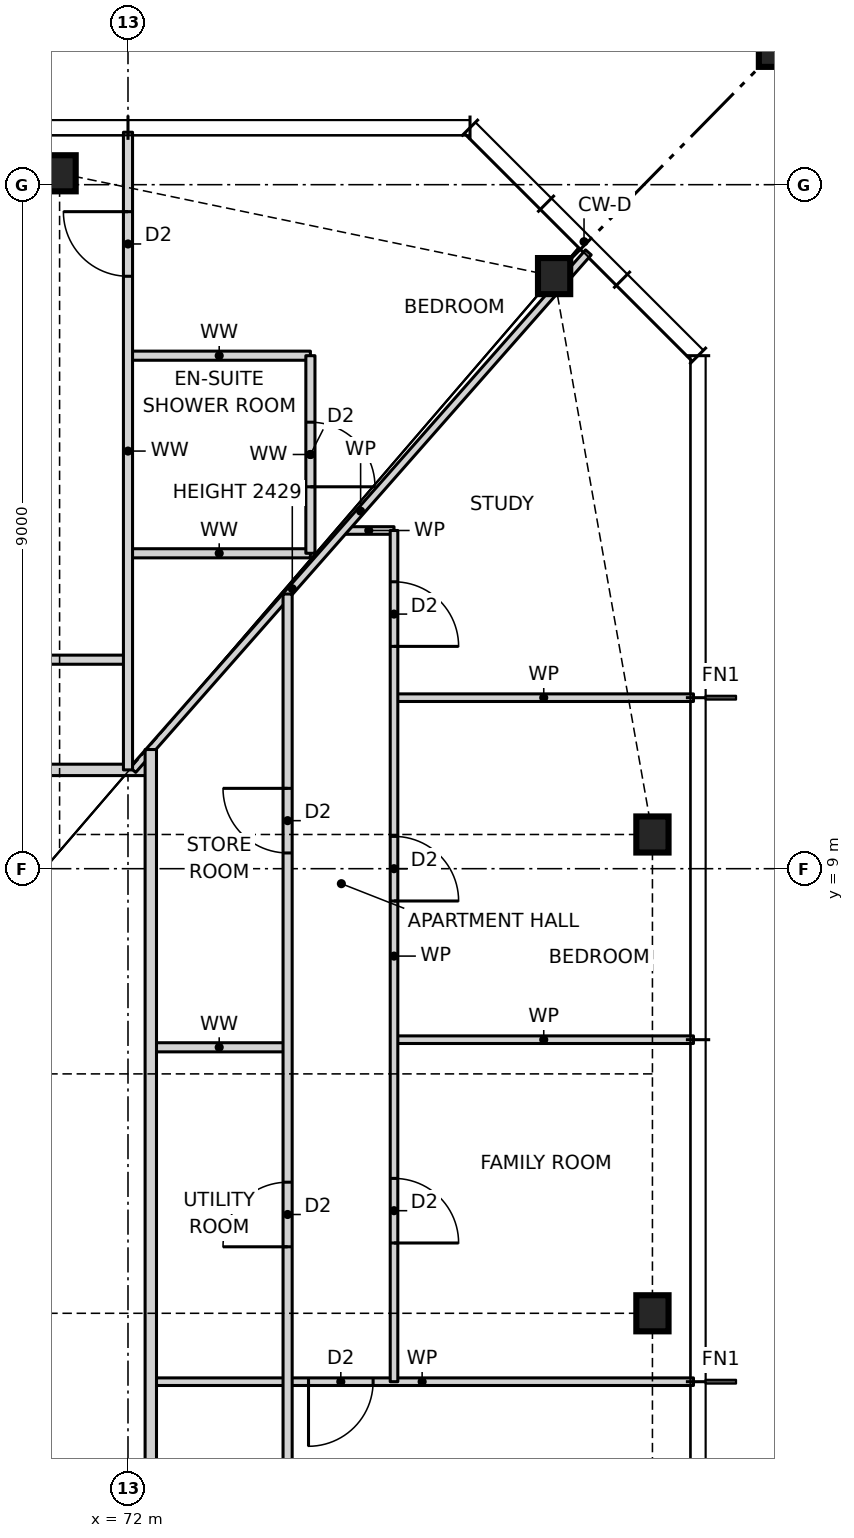
"""IFC4 building model, lengths in metres.
Left out: names, types, materials, properties, quantities, classifications, styles, units other than length and angle.
Written with IfcOpenShell. Run it as: python <this file> out.ifc"""

import sys

from ifc_helpers import new_model, si_unit, direction, frame, frame_2d, origin, origin_2d, place, context, subcontext, project, spatial, rectangle, hollow_rectangle, i_section, extrude, element, fill, save


model = new_model("IFC4")
c1 = context("Model", 3, precision=1e-05, world=origin(), true_north=direction((0.0, 1.0)))
c2 = subcontext(c1, "Body", "Model", "MODEL_VIEW")
j1 = project(units=[si_unit("LENGTHUNIT", "METRE"), si_unit("PLANEANGLEUNIT", "RADIAN")], contexts=[c1])
p1 = place(None, origin())
s1 = spatial("IfcSite", under=j1, at=p1, CompositionType="ELEMENT")
p2 = place(p1, origin())
s2 = spatial("IfcBuilding", under=s1, at=p2, CompositionType="ELEMENT")
p3 = place(p2, frame((0.0, 0.0, 46.5)))
s3 = spatial("IfcBuildingStorey", under=s2, at=p3, CompositionType="ELEMENT", Elevation=46.5)
for number, where, z_axis, x_axis in (
    (1, (78.9, 3.15, 0.0), (0.0, 0.0, 1.0), (1.0, 0.0, 0.0)),
    (2, (78.9, 9.45, 0.0), (0.0, 0.0, 1.0), (1.0, 0.0, 0.0)),
    (3, (77.606, 16.797, 0.0), (0.0, 0.0, 1.0), (1.0, 0.0, 0.0)),
    (4, (71.1, 18.15, 0.0), (0.0, 0.0, 1.0), (1.0, 0.0, 0.0)),
):
    element("IfcColumn", number, at=place(p3, frame(where, z_axis=z_axis, x_axis=x_axis)), inside=s3, PredefinedType="COLUMN", context=c2, shape_type="SweptSolid", body=[
        extrude(i_section(OverallWidth=0.424, OverallDepth=0.475, WebThickness=0.048, FlangeThickness=0.077, at=origin_2d()), origin(), (0.0, 0.0, 1.0), 3.5),
    ])
p4 = place(p3, frame((80.9, 20.15, 0.0), z_axis=(0.0, 0.0, 1.0), x_axis=(1.0, 0.0, 0.0)))
e5 = element("IfcColumn", 5, at=p4, inside=s3, PredefinedType="COLUMN", context=c2, shape_type="SweptSolid", body=[
    extrude(hollow_rectangle(XDim=1.2, YDim=1.2, WallThickness=0.07, at=origin_2d()), origin(), (0.0, 0.0, 1.0), 3.5),
])
p5 = place(p3, frame((72.3, 2.25, 0.0), z_axis=(0.0, 0.0, 1.0), x_axis=(1.0, 0.0, 0.0)))
e6 = element("IfcWall", 6, at=p5, inside=s3, PredefinedType="PARTITIONING", context=c2, shape_type="SweptSolid", body=[
    extrude(rectangle(XDim=7.14, YDim=0.1, at=frame_2d((3.57, 0.0))), origin(), (0.0, 0.0, 1.0), 3.27),
])
p6 = place(p5, frame((2.075, 0.0, 0.0)))
e7 = element("IfcOpeningElement", 7, at=p6, cuts=e6, PredefinedType="OPENING", context=c2, shape_type="SweptSolid", body=[
    extrude(rectangle(XDim=0.85, YDim=2.1, at=frame_2d((0.425, 1.05))), frame((0.0, 0.06, 0.0), z_axis=(0.0, -1.0, 0.0), x_axis=(1.0, 0.0, 0.0)), (0.0, 0.0, 1.0), 0.12),
])
p7 = place(p3, frame((72.3, 6.65, 0.0), z_axis=(0.0, 0.0, 1.0), x_axis=(1.0, 0.0, 0.0)))
e8 = element("IfcWall", 8, at=p7, inside=s3, PredefinedType="PARTITIONING", context=c2, shape_type="SweptSolid", body=[
    extrude(rectangle(XDim=1.8, YDim=0.12, at=frame_2d((0.9, 0.0))), origin(), (0.0, 0.0, 1.0), 3.27),
])
p8 = place(p3, frame((75.5, 6.75, 0.0), z_axis=(0.0, 0.0, 1.0), x_axis=(1.0, 0.0, 0.0)))
e9 = element("IfcWall", 9, at=p8, inside=s3, PredefinedType="PARTITIONING", context=c2, shape_type="SweptSolid", body=[
    extrude(rectangle(XDim=3.94, YDim=0.1, at=frame_2d((1.97, 0.0))), origin(), (0.0, 0.0, 1.0), 3.27),
])
p9 = place(p3, frame((53.7, 10.3, 0.0), z_axis=(0.0, 0.0, 1.0), x_axis=(1.0, 0.0, 0.0)))
e10 = element("IfcWall", 10, at=p9, inside=s3, PredefinedType="PARTITIONING", context=c2, shape_type="SweptSolid", body=[
    extrude(rectangle(XDim=18.6, YDim=0.15, at=frame_2d((9.3, 0.0))), origin(), (0.0, 0.0, 1.0), 3.27),
])
p10 = place(p9, frame((12.8, 0.0, 0.0)))
e11 = element("IfcOpeningElement", 11, at=p10, cuts=e10, PredefinedType="OPENING", context=c2, shape_type="SweptSolid", body=[
    extrude(rectangle(XDim=1.0, YDim=2.1, at=frame_2d((0.5, 1.05))), frame((0.0, 0.085, 0.0), z_axis=(0.0, -1.0, 0.0), x_axis=(1.0, 0.0, 0.0)), (0.0, 0.0, 1.0), 0.17),
])
p11 = place(p3, frame((75.5, 11.25, 0.0), z_axis=(0.0, 0.0, 1.0), x_axis=(1.0, 0.0, 0.0)))
e12 = element("IfcWall", 12, at=p11, inside=s3, PredefinedType="PARTITIONING", context=c2, shape_type="SweptSolid", body=[
    extrude(rectangle(XDim=3.94, YDim=0.1, at=frame_2d((1.97, 0.0))), origin(), (0.0, 0.0, 1.0), 3.27),
])
p12 = place(p3, frame((52.66, 11.75, 0.0), z_axis=(0.0, 0.0, 1.0), x_axis=(1.0, 0.0, 0.0)))
e13 = element("IfcWall", 13, at=p12, inside=s3, PredefinedType="PARTITIONING", context=c2, shape_type="SweptSolid", body=[
    extrude(rectangle(XDim=19.34, YDim=0.12, at=frame_2d((9.67, 0.0))), origin(), (0.0, 0.0, 1.0), 3.27),
])
p13 = place(p12, frame((17.115, 0.0, 0.0)))
e14 = element("IfcOpeningElement", 14, at=p13, cuts=e13, PredefinedType="OPENING", context=c2, shape_type="SweptSolid", body=[
    extrude(rectangle(XDim=0.85, YDim=2.1, at=frame_2d((0.425, 1.05))), frame((0.0, 0.07, 0.0), z_axis=(0.0, -1.0, 0.0), x_axis=(1.0, 0.0, 0.0)), (0.0, 0.0, 1.0), 0.14),
])
p14 = place(p12, frame((13.915, 0.0, 0.0)))
e15 = element("IfcOpeningElement", 15, at=p14, cuts=e13, PredefinedType="OPENING", context=c2, shape_type="SweptSolid", body=[
    extrude(rectangle(XDim=0.85, YDim=2.1, at=frame_2d((0.425, 1.05))), frame((0.0, 0.07, 0.0), z_axis=(0.0, -1.0, 0.0), x_axis=(1.0, 0.0, 0.0)), (0.0, 0.0, 1.0), 0.14),
])
p15 = place(p12, frame((7.165, 0.0, 0.0)))
e16 = element("IfcOpeningElement", 16, at=p15, cuts=e13, PredefinedType="OPENING", context=c2, shape_type="SweptSolid", body=[
    extrude(rectangle(XDim=0.85, YDim=2.1, at=frame_2d((0.425, 1.05))), frame((0.0, 0.07, 0.0), z_axis=(0.0, -1.0, 0.0), x_axis=(1.0, 0.0, 0.0)), (0.0, 0.0, 1.0), 0.14),
])
p16 = place(p12, frame((1.995, 0.0, 0.0)))
e17 = element("IfcOpeningElement", 17, at=p16, cuts=e13, PredefinedType="OPENING", context=c2, shape_type="SweptSolid", body=[
    extrude(rectangle(XDim=0.85, YDim=2.1, at=frame_2d((0.425, 1.05))), frame((0.0, 0.07, 0.0), z_axis=(0.0, -1.0, 0.0), x_axis=(1.0, 0.0, 0.0)), (0.0, 0.0, 1.0), 0.14),
])
p17 = place(p3, frame((72.0, 13.15, 0.0), z_axis=(0.0, 0.0, 1.0), x_axis=(1.0, 0.0, 0.0)))
e18 = element("IfcWall", 18, at=p17, inside=s3, PredefinedType="PARTITIONING", context=c2, shape_type="SweptSolid", body=[
    extrude(rectangle(XDim=2.4, YDim=0.12, at=frame_2d((1.2, 0.0))), origin(), (0.0, 0.0, 1.0), 3.27),
])
p18 = place(p3, frame((74.836, 13.45, 0.0), z_axis=(0.0, 0.0, 1.0), x_axis=(1.0, 0.0, 0.0)))
e19 = element("IfcWall", 19, at=p18, inside=s3, PredefinedType="PARTITIONING", context=c2, shape_type="SweptSolid", body=[
    extrude(rectangle(XDim=0.664, YDim=0.1, at=frame_2d((0.332, 0.0))), origin(), (0.0, 0.0, 1.0), 3.27),
])
p19 = place(p3, frame((72.0, 15.75, 0.0), z_axis=(0.0, 0.0, 1.0), x_axis=(1.0, 0.0, 0.0)))
e20 = element("IfcWall", 20, at=p19, inside=s3, PredefinedType="PARTITIONING", context=c2, shape_type="SweptSolid", body=[
    extrude(rectangle(XDim=2.4, YDim=0.12, at=frame_2d((1.2, 0.0))), origin(), (0.0, 0.0, 1.0), 3.27),
])
p20 = place(p3, frame((72.064, 10.3, 0.0), z_axis=(0.0, 0.0, 1.0), x_axis=(0.660700699661, 0.750649442461, 0.0)))
e21 = element("IfcWall", 21, at=p20, inside=s3, PredefinedType="PARTITIONING", context=c2, shape_type="SweptSolid", body=[
    extrude(rectangle(XDim=9.071, YDim=0.1, at=frame_2d((4.535, 0.0))), origin(), (0.0, 0.0, 1.0), 2.429),
])
p21 = place(p3, frame((75.5, 2.25, 0.0), z_axis=(0.0, 0.0, 1.0), x_axis=(0.0, 1.0, 0.0)))
e22 = element("IfcWall", 22, at=p21, inside=s3, PredefinedType="PARTITIONING", context=c2, shape_type="SweptSolid", body=[
    extrude(rectangle(XDim=11.2, YDim=0.1, at=frame_2d((5.6, 0.0))), origin(), (0.0, 0.0, 1.0), 3.27),
])
p22 = place(p21, frame((1.825, 0.0, 0.0)))
e23 = element("IfcOpeningElement", 23, at=p22, cuts=e22, PredefinedType="OPENING", context=c2, shape_type="SweptSolid", body=[
    extrude(rectangle(XDim=0.85, YDim=2.1, at=frame_2d((0.425, 1.05))), frame((0.0, 0.06, 0.0), z_axis=(0.0, -1.0, 0.0), x_axis=(1.0, 0.0, 0.0)), (0.0, 0.0, 1.0), 0.12),
])
p23 = place(p21, frame((6.325, 0.0, 0.0)))
e24 = element("IfcOpeningElement", 24, at=p23, cuts=e22, PredefinedType="OPENING", context=c2, shape_type="SweptSolid", body=[
    extrude(rectangle(XDim=0.85, YDim=2.1, at=frame_2d((0.425, 1.05))), frame((0.0, 0.06, 0.0), z_axis=(0.0, -1.0, 0.0), x_axis=(1.0, 0.0, 0.0)), (0.0, 0.0, 1.0), 0.12),
])
p24 = place(p21, frame((9.675, 0.0, 0.0)))
e25 = element("IfcOpeningElement", 25, at=p24, cuts=e22, PredefinedType="OPENING", context=c2, shape_type="SweptSolid", body=[
    extrude(rectangle(XDim=0.85, YDim=2.1, at=frame_2d((0.425, 1.05))), frame((0.0, 0.06, 0.0), z_axis=(0.0, -1.0, 0.0), x_axis=(1.0, 0.0, 0.0)), (0.0, 0.0, 1.0), 0.12),
])
p25 = place(p3, frame((74.4, 13.15, 0.0), z_axis=(0.0, 0.0, 1.0), x_axis=(0.0, 1.0, 0.0)))
e26 = element("IfcWall", 26, at=p25, inside=s3, PredefinedType="PARTITIONING", context=c2, shape_type="SweptSolid", body=[
    extrude(rectangle(XDim=2.6, YDim=0.12, at=frame_2d((1.3, 0.0))), origin(), (0.0, 0.0, 1.0), 3.27),
])
p26 = place(p25, frame((0.875, 0.0, 0.0)))
e27 = element("IfcOpeningElement", 27, at=p26, cuts=e26, PredefinedType="OPENING", context=c2, shape_type="SweptSolid", body=[
    extrude(rectangle(XDim=0.85, YDim=2.1, at=frame_2d((0.425, 1.05))), frame((0.0, 0.07, 0.0), z_axis=(0.0, -1.0, 0.0), x_axis=(1.0, 0.0, 0.0)), (0.0, 0.0, 1.0), 0.14),
])
p27 = place(p3, frame((74.1, -12.614, 0.0), z_axis=(0.0, 0.0, 1.0), x_axis=(0.0, 1.0, 0.0)))
e28 = element("IfcWall", 28, at=p27, inside=s3, PredefinedType="PARTITIONING", context=c2, shape_type="SweptSolid", body=[
    extrude(rectangle(XDim=25.228, YDim=0.12, at=frame_2d((12.614, 0.0))), origin(), (0.0, 0.0, 1.0), 3.27),
])
p28 = place(p27, frame((7.239, 0.0, 0.0)))
e29 = element("IfcOpeningElement", 29, at=p28, cuts=e28, PredefinedType="OPENING", context=c2, shape_type="SweptSolid", body=[
    extrude(rectangle(XDim=0.85, YDim=2.1, at=frame_2d((0.425, 1.05))), frame((0.0, 0.07, 0.0), z_axis=(0.0, -1.0, 0.0), x_axis=(1.0, 0.0, 0.0)), (0.0, 0.0, 1.0), 0.14),
])
p29 = place(p27, frame((10.439, 0.0, 0.0)))
e30 = element("IfcOpeningElement", 30, at=p29, cuts=e28, PredefinedType="OPENING", context=c2, shape_type="SweptSolid", body=[
    extrude(rectangle(XDim=0.85, YDim=2.1, at=frame_2d((0.425, 1.05))), frame((0.0, 0.07, 0.0), z_axis=(0.0, -1.0, 0.0), x_axis=(1.0, 0.0, 0.0)), (0.0, 0.0, 1.0), 0.14),
])
p30 = place(p27, frame((2.507, 0.0, 0.0)))
e31 = element("IfcOpeningElement", 31, at=p30, cuts=e28, PredefinedType="OPENING", context=c2, shape_type="SweptSolid", body=[
    extrude(rectangle(XDim=0.85, YDim=2.1, at=frame_2d((0.425, 1.05))), frame((0.0, 0.07, 0.0), z_axis=(0.0, -1.0, 0.0), x_axis=(1.0, 0.0, 0.0)), (0.0, 0.0, 1.0), 0.14),
])
p31 = place(p27, frame((16.639, 0.0, 0.0)))
e32 = element("IfcOpeningElement", 32, at=p31, cuts=e28, PredefinedType="OPENING", context=c2, shape_type="SweptSolid", body=[
    extrude(rectangle(XDim=0.85, YDim=2.1, at=frame_2d((0.425, 1.05))), frame((0.0, 0.07, 0.0), z_axis=(0.0, -1.0, 0.0), x_axis=(1.0, 0.0, 0.0)), (0.0, 0.0, 1.0), 0.14),
])
p32 = place(p27, frame((21.821, 0.0, 0.0)))
e33 = element("IfcOpeningElement", 33, at=p32, cuts=e28, PredefinedType="OPENING", context=c2, shape_type="SweptSolid", body=[
    extrude(rectangle(XDim=0.85, YDim=2.1, at=frame_2d((0.425, 1.05))), frame((0.0, 0.07, 0.0), z_axis=(0.0, -1.0, 0.0), x_axis=(1.0, 0.0, 0.0)), (0.0, 0.0, 1.0), 0.14),
])
p33 = place(p3, frame((72.3, -10.568, 0.0), z_axis=(0.0, 0.0, 1.0), x_axis=(0.0, 1.0, 0.0)))
e34 = element("IfcWall", 34, at=p33, inside=s3, PredefinedType="PARTITIONING", context=c2, shape_type="SweptSolid", body=[
    extrude(rectangle(XDim=21.136, YDim=0.15, at=frame_2d((10.568, 0.0))), origin(), (0.0, 0.0, 1.0), 3.27),
])
p34 = place(p33, frame((8.318, 0.0, 0.0)))
e35 = element("IfcOpeningElement", 35, at=p34, cuts=e34, PredefinedType="OPENING", context=c2, shape_type="SweptSolid", body=[
    extrude(rectangle(XDim=1.0, YDim=2.1, at=frame_2d((0.5, 1.05))), frame((0.0, 0.085, 0.0), z_axis=(0.0, -1.0, 0.0), x_axis=(1.0, 0.0, 0.0)), (0.0, 0.0, 1.0), 0.17),
])
p35 = place(p3, frame((72.0, 10.3, 0.0), z_axis=(0.0, 0.0, 1.0), x_axis=(0.0, 1.0, 0.0)))
e36 = element("IfcWall", 36, at=p35, inside=s3, PredefinedType="PARTITIONING", context=c2, shape_type="SweptSolid", body=[
    extrude(rectangle(XDim=8.39, YDim=0.12, at=frame_2d((4.195, 0.0))), origin(), (0.0, 0.0, 1.0), 3.27),
])
p36 = place(p35, frame((6.495, 0.0, 0.0)))
e37 = element("IfcOpeningElement", 37, at=p36, cuts=e36, PredefinedType="OPENING", context=c2, shape_type="SweptSolid", body=[
    extrude(rectangle(XDim=0.85, YDim=2.1, at=frame_2d((0.425, 1.05))), frame((0.0, 0.07, 0.0), z_axis=(0.0, -1.0, 0.0), x_axis=(1.0, 0.0, 0.0)), (0.0, 0.0, 1.0), 0.14),
])
p37 = place(p6, frame((0.85, 0.0, 0.0), z_axis=(0.0, 0.0, 1.0), x_axis=(-1.0, 0.0, 0.0)))
e38 = element("IfcDoor", 38, at=p37, inside=s3, OperationType="SINGLE_SWING_RIGHT", PredefinedType="DOOR", context=c2, shape_type="SweptSolid", body=[
    extrude(rectangle(XDim=0.85, YDim=2.1, at=frame_2d((0.425, 1.05))), frame((0.0, 0.025, 0.0), z_axis=(0.0, -1.0, 0.0), x_axis=(1.0, 0.0, 0.0)), (0.0, 0.0, 1.0), 0.05),
])
fill(e7, e38)
p38 = place(p22, frame((0.85, 0.0, 0.0), z_axis=(0.0, 0.0, 1.0), x_axis=(-1.0, 0.0, 0.0)))
e39 = element("IfcDoor", 39, at=p38, inside=s3, OperationType="SINGLE_SWING_RIGHT", PredefinedType="DOOR", context=c2, shape_type="SweptSolid", body=[
    extrude(rectangle(XDim=0.85, YDim=2.1, at=frame_2d((0.425, 1.05))), frame((0.0, 0.025, 0.0), z_axis=(0.0, -1.0, 0.0), x_axis=(1.0, 0.0, 0.0)), (0.0, 0.0, 1.0), 0.05),
])
fill(e23, e39)
p39 = place(p23, frame((0.85, 0.0, 0.0), z_axis=(0.0, 0.0, 1.0), x_axis=(-1.0, 0.0, 0.0)))
e40 = element("IfcDoor", 40, at=p39, inside=s3, OperationType="SINGLE_SWING_RIGHT", PredefinedType="DOOR", context=c2, shape_type="SweptSolid", body=[
    extrude(rectangle(XDim=0.85, YDim=2.1, at=frame_2d((0.425, 1.05))), frame((0.0, 0.025, 0.0), z_axis=(0.0, -1.0, 0.0), x_axis=(1.0, 0.0, 0.0)), (0.0, 0.0, 1.0), 0.05),
])
fill(e24, e40)
p40 = place(p24, frame((0.85, 0.0, 0.0), z_axis=(0.0, 0.0, 1.0), x_axis=(-1.0, 0.0, 0.0)))
e41 = element("IfcDoor", 41, at=p40, inside=s3, OperationType="SINGLE_SWING_RIGHT", PredefinedType="DOOR", context=c2, shape_type="SweptSolid", body=[
    extrude(rectangle(XDim=0.85, YDim=2.1, at=frame_2d((0.425, 1.05))), frame((0.0, 0.025, 0.0), z_axis=(0.0, -1.0, 0.0), x_axis=(1.0, 0.0, 0.0)), (0.0, 0.0, 1.0), 0.05),
])
fill(e25, e41)
p41 = place(p31, origin())
e42 = element("IfcDoor", 42, at=p41, inside=s3, OperationType="SINGLE_SWING_LEFT", PredefinedType="DOOR", context=c2, shape_type="SweptSolid", body=[
    extrude(rectangle(XDim=0.85, YDim=2.1, at=frame_2d((0.425, 1.05))), frame((0.0, 0.025, 0.0), z_axis=(0.0, -1.0, 0.0), x_axis=(1.0, 0.0, 0.0)), (0.0, 0.0, 1.0), 0.05),
])
fill(e32, e42)
p42 = place(p32, origin())
e43 = element("IfcDoor", 43, at=p42, inside=s3, OperationType="SINGLE_SWING_RIGHT", PredefinedType="DOOR", context=c2, shape_type="SweptSolid", body=[
    extrude(rectangle(XDim=0.85, YDim=2.1, at=frame_2d((0.425, 1.05))), frame((0.0, 0.025, 0.0), z_axis=(0.0, -1.0, 0.0), x_axis=(1.0, 0.0, 0.0)), (0.0, 0.0, 1.0), 0.05),
])
fill(e33, e43)
p43 = place(p26, frame((0.85, 0.0, 0.0), z_axis=(0.0, 0.0, 1.0), x_axis=(-1.0, 0.0, 0.0)))
e44 = element("IfcDoor", 44, at=p43, inside=s3, OperationType="SINGLE_SWING_RIGHT", PredefinedType="DOOR", context=c2, shape_type="SweptSolid", body=[
    extrude(rectangle(XDim=0.85, YDim=2.1, at=frame_2d((0.425, 1.05))), frame((0.0, 0.025, 0.0), z_axis=(0.0, -1.0, 0.0), x_axis=(1.0, 0.0, 0.0)), (0.0, 0.0, 1.0), 0.05),
])
fill(e27, e44)
p44 = place(p36, origin())
e45 = element("IfcDoor", 45, at=p44, inside=s3, OperationType="SINGLE_SWING_RIGHT", PredefinedType="DOOR", context=c2, shape_type="SweptSolid", body=[
    extrude(rectangle(XDim=0.85, YDim=2.1, at=frame_2d((0.425, 1.05))), frame((0.0, 0.025, 0.0), z_axis=(0.0, -1.0, 0.0), x_axis=(1.0, 0.0, 0.0)), (0.0, 0.0, 1.0), 0.05),
])
fill(e37, e45)
save(model, sys.argv[1])
